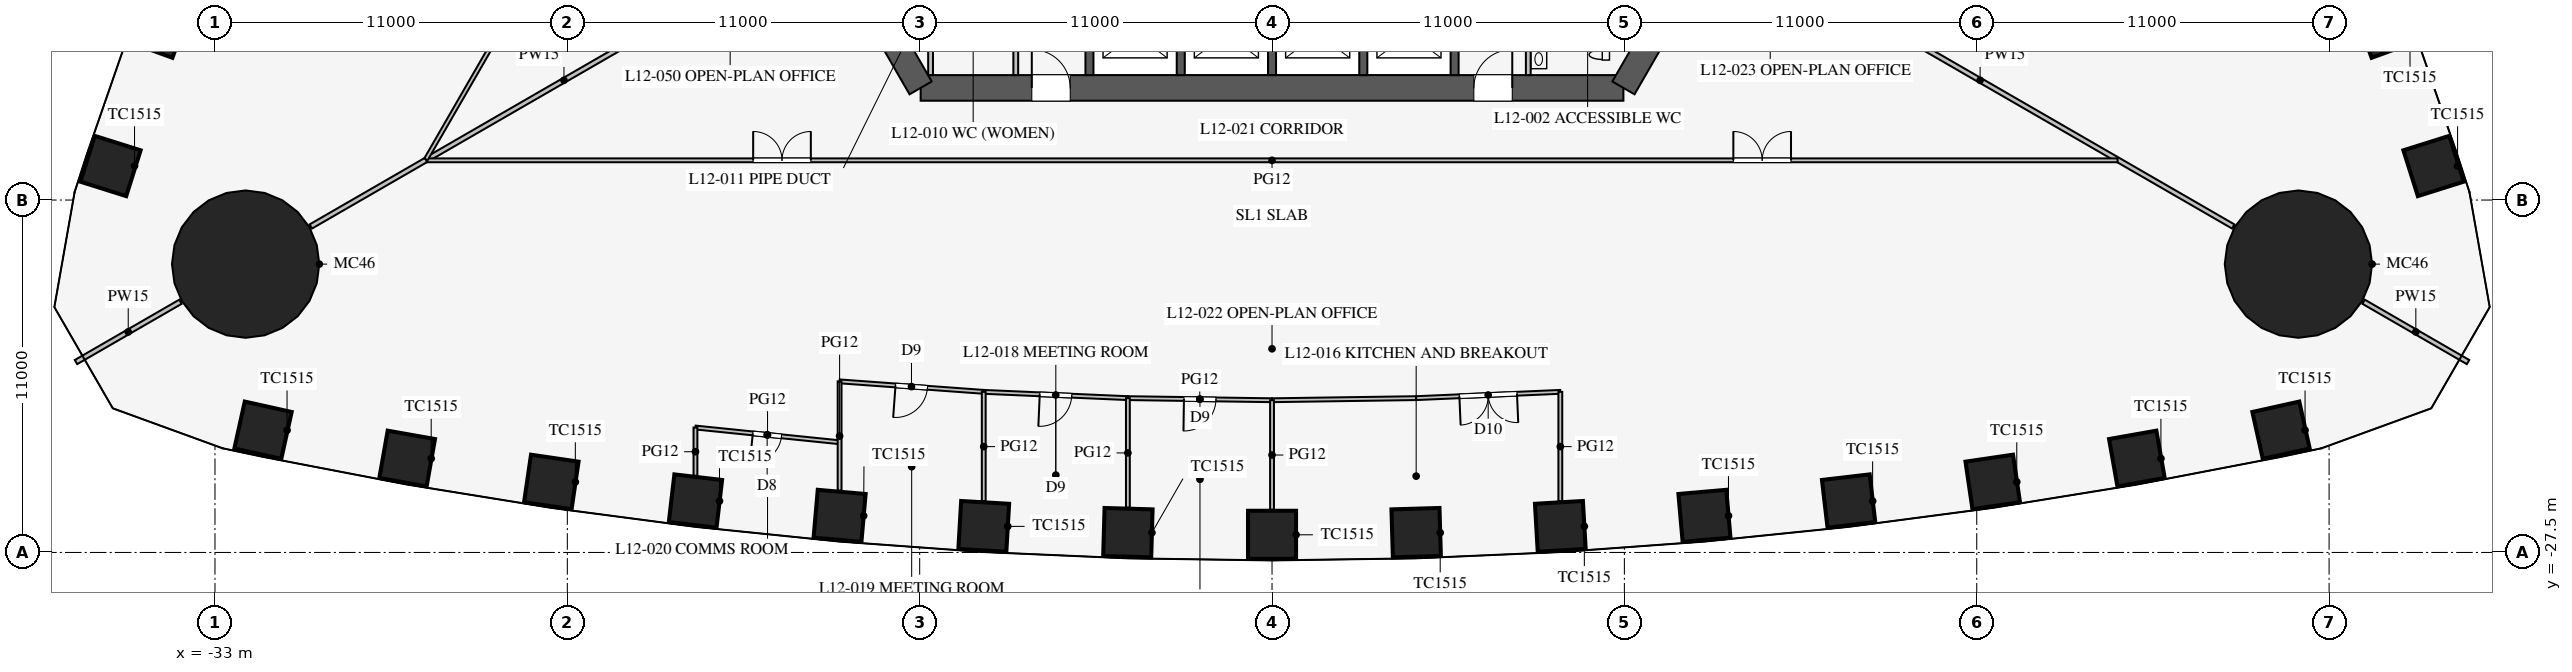
"""IFC4 building model, lengths in metres.
Left out: names, types, materials, properties, quantities, classifications, styles, units other than length and angle.
Written with IfcOpenShell. Run it as: python <this file> out.ifc"""

import sys

from ifc_helpers import new_model, si_unit, direction, frame, frame_2d, origin, origin_2d, place, context, subcontext, project, spatial, rectangle, circle, extrude, element, fill, save


model = new_model("IFC4")
c1 = context("Model", 3, precision=1e-05, world=origin(), true_north=direction((0.0, 1.0)))
c2 = subcontext(c1, "Body", "Model", "MODEL_VIEW")
j1 = project(units=[si_unit("LENGTHUNIT", "METRE"), si_unit("PLANEANGLEUNIT", "RADIAN")], contexts=[c1])
p1 = place(None, origin())
s1 = spatial("IfcSite", under=j1, at=p1, CompositionType="ELEMENT")
p2 = place(p1, origin())
s2 = spatial("IfcBuilding", under=s1, at=p2, CompositionType="ELEMENT")
p3 = place(p2, frame((0.0, 0.0, 54.3)))
s3 = spatial("IfcBuildingStorey", under=s2, at=p3, CompositionType="ELEMENT", Elevation=54.3)
for number, where, z_axis, x_axis in (
    (1, (-31.5, -23.685, 0.0), (0.0, 0.0, 1.0), (0.976, -0.217, 0.0)),
    (2, (-27.0, -24.568, 0.0), (0.0, 0.0, 1.0), (0.985, -0.174, 0.0)),
    (3, (-22.5, -25.299, 0.0), (0.0, 0.0, 1.0), (0.989, -0.145, 0.0)),
    (4, (-18.0, -25.895, 0.0), (0.0, 0.0, 1.0), (0.993, -0.116, 0.0)),
    (5, (-13.5, -26.357, 0.0), (0.0, 0.0, 1.0), (0.996, -0.087, 0.0)),
    (6, (-9.0, -26.686, 0.0), (0.0, 0.0, 1.0), (0.998, -0.058, 0.0)),
    (7, (-4.5, -26.883, 0.0), (0.0, 0.0, 1.0), (1.0, -0.029, 0.0)),
    (8, (0.0, -26.949, 0.0), (0.0, 0.0, 1.0), (1.0, 0.0, 0.0)),
    (9, (4.5, -26.883, 0.0), (0.0, 0.0, 1.0), (1.0, 0.029, 0.0)),
    (10, (9.0, -26.686, 0.0), (0.0, 0.0, 1.0), (0.998, 0.058, 0.0)),
    (11, (13.5, -26.357, 0.0), (0.0, 0.0, 1.0), (0.996, 0.087, 0.0)),
    (12, (18.0, -25.895, 0.0), (0.0, 0.0, 1.0), (0.993, 0.116, 0.0)),
    (13, (22.5, -25.299, 0.0), (0.0, 0.0, 1.0), (0.989, 0.145, 0.0)),
    (14, (27.0, -24.568, 0.0), (0.0, 0.0, 1.0), (0.985, 0.174, 0.0)),
    (15, (31.5, -23.685, 0.0), (0.0, 0.0, 1.0), (0.976, 0.217, 0.0)),
    (16, (36.262, -15.438, 0.0), (0.0, 0.0, 1.0), (-0.3, 0.954, 0.0)),
    (17, (34.776, -11.099, 0.0), (0.0, 0.0, 1.0), (-0.342, 0.94, 0.0)),
    (18, (-34.776, -11.099, 0.0), (0.0, 0.0, 1.0), (-0.342, -0.94, 0.0)),
    (19, (-36.262, -15.438, 0.0), (0.0, 0.0, 1.0), (-0.3, -0.954, 0.0)),
):
    element("IfcColumn", number, at=place(p3, frame(where, z_axis=z_axis, x_axis=x_axis)), inside=s3, PredefinedType="COLUMN", context=c2, shape_type="SweptSolid", body=[
        extrude(rectangle(XDim=1.5, YDim=1.5, at=origin_2d()), origin(), (0.0, 0.0, 1.0), 4.2),
    ])
for number, where, z_axis, x_axis in (
    (20, (32.043, -18.5, 0.0), (0.0, 0.0, 1.0), (1.0, 0.0, 0.0)),
    (21, (-32.043, -18.5, 0.0), (0.0, 0.0, 1.0), (1.0, 0.0, 0.0)),
):
    element("IfcColumn", number, at=place(p3, frame(where, z_axis=z_axis, x_axis=x_axis)), inside=s3, PredefinedType="COLUMN", context=c2, shape_type="SweptSolid", body=[
        extrude(circle(Radius=2.3, at=origin_2d()), origin(), (0.0, 0.0, 1.0), 4.2),
    ])
p4 = place(p3, frame((-10.97, -13.0, 0.0), z_axis=(0.0, 0.0, 1.0), x_axis=(1.0, 0.0, 0.0)))
e22 = element("IfcWall", 22, at=p4, inside=s3, PredefinedType="SHEAR", context=c2, shape_type="SweptSolid", body=[
    extrude(rectangle(XDim=21.939, YDim=0.8, at=frame_2d((10.97, 0.0))), origin(), (0.0, 0.0, 1.0), 4.2),
])
p5 = place(p4, frame((17.27, 0.0, 0.0)))
e23 = element("IfcOpeningElement", 23, at=p5, cuts=e22, PredefinedType="OPENING", context=c2, shape_type="SweptSolid", body=[
    extrude(rectangle(XDim=1.2, YDim=2.1, at=frame_2d((0.6, 1.05))), frame((0.0, 0.41, 0.0), z_axis=(0.0, -1.0, 0.0), x_axis=(1.0, 0.0, 0.0)), (0.0, 0.0, 1.0), 0.82),
])
p6 = place(p4, frame((3.47, 0.0, 0.0)))
e24 = element("IfcOpeningElement", 24, at=p6, cuts=e22, PredefinedType="OPENING", context=c2, shape_type="SweptSolid", body=[
    extrude(rectangle(XDim=1.2, YDim=2.1, at=frame_2d((0.6, 1.05))), frame((0.0, 0.41, 0.0), z_axis=(0.0, -1.0, 0.0), x_axis=(1.0, 0.0, 0.0)), (0.0, 0.0, 1.0), 0.82),
])
for number, where, z_axis, x_axis in (
    (25, (10.97, -13.0, 0.0), (0.0, 0.0, 1.0), (0.5, 0.866, 0.0)),
    (26, (-16.743, -3.0, 0.0), (0.0, 0.0, 1.0), (0.5, -0.866, 0.0)),
):
    element("IfcWall", number, at=place(p3, frame(where, z_axis=z_axis, x_axis=x_axis)), inside=s3, PredefinedType="SHEAR", context=c2, shape_type="SweptSolid", body=[
        extrude(rectangle(XDim=11.547, YDim=0.8, at=frame_2d((5.773, 0.0))), origin(), (0.0, 0.0, 1.0), 4.2),
    ])
for number, where, z_axis, x_axis in (
    (27, (-5.7, -10.025, 0.0), (0.0, 0.0, 1.0), (0.0, -1.0, 0.0)),
    (28, (-2.85, -10.025, 0.0), (0.0, 0.0, 1.0), (0.0, -1.0, 0.0)),
    (29, (0.0, -10.025, 0.0), (0.0, 0.0, 1.0), (0.0, -1.0, 0.0)),
    (30, (2.85, -10.025, 0.0), (0.0, 0.0, 1.0), (0.0, -1.0, 0.0)),
    (31, (5.7, -10.025, 0.0), (0.0, 0.0, 1.0), (0.0, -1.0, 0.0)),
):
    element("IfcWall", number, at=place(p3, frame(where, z_axis=z_axis, x_axis=x_axis)), inside=s3, PredefinedType="SHEAR", context=c2, shape_type="SweptSolid", body=[
        extrude(rectangle(XDim=2.575, YDim=0.25, at=frame_2d((1.288, 0.0))), origin(), (0.0, 0.0, 1.0), 4.2),
    ])
p7 = place(p3, frame((8.0, -7.5, 0.0), z_axis=(0.0, 0.0, 1.0), x_axis=(0.0, -1.0, 0.0)))
e32 = element("IfcWall", 32, at=p7, inside=s3, PredefinedType="PARTITIONING", context=c2, shape_type="SweptSolid", body=[
    extrude(rectangle(XDim=5.1, YDim=0.15, at=frame_2d((2.55, 0.0))), origin(), (0.0, 0.0, 1.0), 4.0),
])
p8 = place(p7, frame((2.6, 0.0, 0.0)))
e33 = element("IfcOpeningElement", 33, at=p8, cuts=e32, PredefinedType="OPENING", context=c2, shape_type="SweptSolid", body=[
    extrude(rectangle(XDim=0.9, YDim=2.1, at=frame_2d((0.45, 1.05))), frame((0.0, 0.085, 0.0), z_axis=(0.0, -1.0, 0.0), x_axis=(1.0, 0.0, 0.0)), (0.0, 0.0, 1.0), 0.17),
])
p9 = place(p3, frame((-8.0, -7.5, 0.0), z_axis=(0.0, 0.0, 1.0), x_axis=(0.0, -1.0, 0.0)))
e34 = element("IfcWall", 34, at=p9, inside=s3, PredefinedType="PARTITIONING", context=c2, shape_type="SweptSolid", body=[
    extrude(rectangle(XDim=5.1, YDim=0.15, at=frame_2d((2.55, 0.0))), origin(), (0.0, 0.0, 1.0), 4.0),
])
p10 = place(p9, frame((2.6, 0.0, 0.0)))
e35 = element("IfcOpeningElement", 35, at=p10, cuts=e34, PredefinedType="OPENING", context=c2, shape_type="SweptSolid", body=[
    extrude(rectangle(XDim=0.9, YDim=2.1, at=frame_2d((0.45, 1.05))), frame((0.0, 0.085, 0.0), z_axis=(0.0, -1.0, 0.0), x_axis=(1.0, 0.0, 0.0)), (0.0, 0.0, 1.0), 0.17),
])
p11 = place(p3, frame((-10.66, -8.5, 0.0), z_axis=(0.0, 0.0, 1.0), x_axis=(0.0, -1.0, 0.0)))
e36 = element("IfcWall", 36, at=p11, inside=s3, PredefinedType="PARTITIONING", context=c2, shape_type="SweptSolid", body=[
    extrude(rectangle(XDim=4.1, YDim=0.15, at=frame_2d((2.05, 0.0))), origin(), (0.0, 0.0, 1.0), 4.0),
])
p12 = place(p3, frame((14.203, -8.2, 0.0), z_axis=(0.0, 0.0, 1.0), x_axis=(0.866024965723, -0.500000758745, 0.0)))
e37 = element("IfcWall", 37, at=p12, inside=s3, PredefinedType="PARTITIONING", context=c2, shape_type="SweptSolid", body=[
    extrude(rectangle(XDim=18.25, YDim=0.15, at=frame_2d((9.125, 0.0))), origin(), (0.0, 0.0, 1.0), 2.3),
])
p13 = place(p3, frame((34.078, -19.675, 0.0), z_axis=(0.0, 0.0, 1.0), x_axis=(0.866019247219, -0.500010663332, 0.0)))
e38 = element("IfcWall", 38, at=p13, inside=s3, PredefinedType="PARTITIONING", context=c2, shape_type="SweptSolid", body=[
    extrude(rectangle(XDim=3.764, YDim=0.15, at=frame_2d((1.882, 0.0))), origin(), (0.0, 0.0, 1.0), 2.3),
])
p14 = place(p3, frame((-14.203, -8.2, 0.0), z_axis=(0.0, 0.0, 1.0), x_axis=(-0.866024965723, -0.500000758745, 0.0)))
e39 = element("IfcWall", 39, at=p14, inside=s3, PredefinedType="PARTITIONING", context=c2, shape_type="SweptSolid", body=[
    extrude(rectangle(XDim=18.25, YDim=0.15, at=frame_2d((9.125, 0.0))), origin(), (0.0, 0.0, 1.0), 2.3),
])
p15 = place(p3, frame((-34.078, -19.675, 0.0), z_axis=(0.0, 0.0, 1.0), x_axis=(-0.866019247219, -0.500010663332, 0.0)))
e40 = element("IfcWall", 40, at=p15, inside=s3, PredefinedType="PARTITIONING", context=c2, shape_type="SweptSolid", body=[
    extrude(rectangle(XDim=3.764, YDim=0.15, at=frame_2d((1.882, 0.0))), origin(), (0.0, 0.0, 1.0), 2.3),
])
p16 = place(p3, frame((-26.398, -15.26, 0.0), z_axis=(0.0, 0.0, 1.0), x_axis=(1.0, 0.0, 0.0)))
e41 = element("IfcWall", 41, at=p16, inside=s3, PredefinedType="PARTITIONING", context=c2, shape_type="SweptSolid", body=[
    extrude(rectangle(XDim=52.796, YDim=0.12, at=frame_2d((26.398, 0.0))), origin(), (0.0, 0.0, 1.0), 2.9),
])
p17 = place(p16, frame((10.2, 0.0, 0.15)))
e42 = element("IfcOpeningElement", 42, at=p17, cuts=e41, PredefinedType="OPENING", context=c2, shape_type="SweptSolid", body=[
    extrude(rectangle(XDim=1.8, YDim=2.1, at=frame_2d((0.9, 1.05))), frame((0.0, 0.07, 0.0), z_axis=(0.0, -1.0, 0.0), x_axis=(1.0, 0.0, 0.0)), (0.0, 0.0, 1.0), 0.14),
])
p18 = place(p16, frame((40.8, 0.0, 0.15)))
e43 = element("IfcOpeningElement", 43, at=p18, cuts=e41, PredefinedType="OPENING", context=c2, shape_type="SweptSolid", body=[
    extrude(rectangle(XDim=1.8, YDim=2.1, at=frame_2d((0.9, 1.05))), frame((0.0, 0.07, 0.0), z_axis=(0.0, -1.0, 0.0), x_axis=(1.0, 0.0, 0.0)), (0.0, 0.0, 1.0), 0.14),
])
p19 = place(p3, frame((0.0, -22.749, 0.0), z_axis=(0.0, 0.0, 1.0), x_axis=(0.999894311967, 0.014538393859, 0.0)))
e44 = element("IfcWall", 44, at=p19, inside=s3, PredefinedType="PARTITIONING", context=c2, shape_type="SweptSolid", body=[
    extrude(rectangle(XDim=4.5, YDim=0.12, at=frame_2d((2.25, 0.0))), origin(), (0.0, 0.0, 1.0), 2.9),
])
p20 = place(p3, frame((4.5, -22.683, 0.0), z_axis=(0.0, 0.0, 1.0), x_axis=(0.999052370647, 0.043524254212, 0.0)))
e45 = element("IfcWall", 45, at=p20, inside=s3, PredefinedType="PARTITIONING", context=c2, shape_type="SweptSolid", body=[
    extrude(rectangle(XDim=4.504, YDim=0.12, at=frame_2d((2.252, 0.0))), origin(), (0.0, 0.0, 1.0), 2.9),
])
p21 = place(p20, frame((1.35, 0.0, 0.15)))
e46 = element("IfcOpeningElement", 46, at=p21, cuts=e45, PredefinedType="OPENING", context=c2, shape_type="SweptSolid", body=[
    extrude(rectangle(XDim=1.8, YDim=2.1, at=frame_2d((0.9, 1.05))), frame((0.0, 0.07, 0.0), z_axis=(0.0, -1.0, 0.0), x_axis=(1.0, 0.0, 0.0)), (0.0, 0.0, 1.0), 0.14),
])
p22 = place(p3, frame((-13.5, -22.16, 0.0), z_axis=(0.0, 0.0, 1.0), x_axis=(0.997363894896, -0.072562119306, 0.0)))
e47 = element("IfcWall", 47, at=p22, inside=s3, PredefinedType="PARTITIONING", context=c2, shape_type="SweptSolid", body=[
    extrude(rectangle(XDim=4.512, YDim=0.12, at=frame_2d((2.256, 0.0))), origin(), (0.0, 0.0, 1.0), 2.9),
])
p23 = place(p22, frame((1.75, 0.0, 0.15)))
e48 = element("IfcOpeningElement", 48, at=p23, cuts=e47, PredefinedType="OPENING", context=c2, shape_type="SweptSolid", body=[
    extrude(rectangle(XDim=1.0, YDim=2.1, at=frame_2d((0.5, 1.05))), frame((0.0, 0.07, 0.0), z_axis=(0.0, -1.0, 0.0), x_axis=(1.0, 0.0, 0.0)), (0.0, 0.0, 1.0), 0.14),
])
p24 = place(p3, frame((-18.0, -23.601, 0.0), z_axis=(0.0, 0.0, 1.0), x_axis=(0.994827688697, -0.101576915697, 0.0)))
e49 = element("IfcWall", 49, at=p24, inside=s3, PredefinedType="PARTITIONING", context=c2, shape_type="SweptSolid", body=[
    extrude(rectangle(XDim=4.523, YDim=0.12, at=frame_2d((2.262, 0.0))), origin(), (0.0, 0.0, 1.0), 2.9),
])
p25 = place(p24, frame((1.8, 0.0, 0.15)))
e50 = element("IfcOpeningElement", 50, at=p25, cuts=e49, PredefinedType="OPENING", context=c2, shape_type="SweptSolid", body=[
    extrude(rectangle(XDim=0.9, YDim=2.1, at=frame_2d((0.45, 1.05))), frame((0.0, 0.07, 0.0), z_axis=(0.0, -1.0, 0.0), x_axis=(1.0, 0.0, 0.0)), (0.0, 0.0, 1.0), 0.14),
])
p26 = place(p3, frame((-4.5, -22.683, 0.0), z_axis=(0.0, 0.0, 1.0), x_axis=(0.999894311967, -0.014538393859, 0.0)))
e51 = element("IfcWall", 51, at=p26, inside=s3, PredefinedType="PARTITIONING", context=c2, shape_type="SweptSolid", body=[
    extrude(rectangle(XDim=4.5, YDim=0.12, at=frame_2d((2.25, 0.0))), origin(), (0.0, 0.0, 1.0), 2.9),
])
p27 = place(p26, frame((1.75, 0.0, 0.15)))
e52 = element("IfcOpeningElement", 52, at=p27, cuts=e51, PredefinedType="OPENING", context=c2, shape_type="SweptSolid", body=[
    extrude(rectangle(XDim=1.0, YDim=2.1, at=frame_2d((0.5, 1.05))), frame((0.0, 0.07, 0.0), z_axis=(0.0, -1.0, 0.0), x_axis=(1.0, 0.0, 0.0)), (0.0, 0.0, 1.0), 0.14),
])
p28 = place(p3, frame((-9.0, -22.487, 0.0), z_axis=(0.0, 0.0, 1.0), x_axis=(0.999052370647, -0.043524254212, 0.0)))
e53 = element("IfcWall", 53, at=p28, inside=s3, PredefinedType="PARTITIONING", context=c2, shape_type="SweptSolid", body=[
    extrude(rectangle(XDim=4.504, YDim=0.12, at=frame_2d((2.252, 0.0))), origin(), (0.0, 0.0, 1.0), 2.9),
])
p29 = place(p28, frame((1.75, 0.0, 0.15)))
e54 = element("IfcOpeningElement", 54, at=p29, cuts=e53, PredefinedType="OPENING", context=c2, shape_type="SweptSolid", body=[
    extrude(rectangle(XDim=1.0, YDim=2.1, at=frame_2d((0.5, 1.05))), frame((0.0, 0.07, 0.0), z_axis=(0.0, -1.0, 0.0), x_axis=(1.0, 0.0, 0.0)), (0.0, 0.0, 1.0), 0.14),
])
p30 = place(p3, frame((0.0, -22.749, 0.0), z_axis=(0.0, 0.0, 1.0), x_axis=(0.0, -1.0, 0.0)))
e55 = element("IfcWall", 55, at=p30, inside=s3, PredefinedType="PARTITIONING", context=c2, shape_type="SweptSolid", body=[
    extrude(rectangle(XDim=3.42, YDim=0.12, at=frame_2d((1.71, 0.0))), origin(), (0.0, 0.0, 1.0), 2.9),
])
p31 = place(p3, frame((9.0, -22.487, 0.0), z_axis=(0.0, 0.0, 1.0), x_axis=(0.0, -1.0, 0.0)))
e56 = element("IfcWall", 56, at=p31, inside=s3, PredefinedType="PARTITIONING", context=c2, shape_type="SweptSolid", body=[
    extrude(rectangle(XDim=3.417, YDim=0.12, at=frame_2d((1.709, 0.0))), origin(), (0.0, 0.0, 1.0), 2.9),
])
p32 = place(p3, frame((-13.5, -22.16, 0.0), z_axis=(0.0, 0.0, 1.0), x_axis=(0.0, -1.0, 0.0)))
e57 = element("IfcWall", 57, at=p32, inside=s3, PredefinedType="PARTITIONING", context=c2, shape_type="SweptSolid", body=[
    extrude(rectangle(XDim=3.414, YDim=0.12, at=frame_2d((1.707, 0.0))), origin(), (0.0, 0.0, 1.0), 2.9),
])
p33 = place(p3, frame((-18.0, -23.601, 0.0), z_axis=(0.0, 0.0, 1.0), x_axis=(0.0, -1.0, 0.0)))
e58 = element("IfcWall", 58, at=p33, inside=s3, PredefinedType="PARTITIONING", context=c2, shape_type="SweptSolid", body=[
    extrude(rectangle(XDim=1.509, YDim=0.12, at=frame_2d((0.755, 0.0))), origin(), (0.0, 0.0, 1.0), 2.9),
])
p34 = place(p3, frame((-4.5, -22.683, 0.0), z_axis=(0.0, 0.0, 1.0), x_axis=(0.0, -1.0, 0.0)))
e59 = element("IfcWall", 59, at=p34, inside=s3, PredefinedType="PARTITIONING", context=c2, shape_type="SweptSolid", body=[
    extrude(rectangle(XDim=3.419, YDim=0.12, at=frame_2d((1.71, 0.0))), origin(), (0.0, 0.0, 1.0), 2.9),
])
p35 = place(p3, frame((-9.0, -22.487, 0.0), z_axis=(0.0, 0.0, 1.0), x_axis=(0.0, -1.0, 0.0)))
e60 = element("IfcWall", 60, at=p35, inside=s3, PredefinedType="PARTITIONING", context=c2, shape_type="SweptSolid", body=[
    extrude(rectangle(XDim=3.417, YDim=0.12, at=frame_2d((1.709, 0.0))), origin(), (0.0, 0.0, 1.0), 2.9),
])
p36 = place(p3, frame((-0.016, 30.491, 0.0), z_axis=(0.0, 0.0, 1.0), x_axis=(-0.50000091641, -0.866024874695, 0.0)))
e61 = element("IfcWall", 61, at=p36, inside=s3, PredefinedType="PARTITIONING", context=c2, shape_type="SweptSolid", body=[
    extrude(rectangle(XDim=52.796, YDim=0.12, at=frame_2d((26.398, 0.0))), origin(), (0.0, 0.0, 1.0), 2.9),
])
p37 = place(p36, frame((10.2, 0.0, 0.15)))
e62 = element("IfcOpeningElement", 62, at=p37, cuts=e61, PredefinedType="OPENING", context=c2, shape_type="SweptSolid", body=[
    extrude(rectangle(XDim=1.8, YDim=2.1, at=frame_2d((0.9, 1.05))), frame((0.0, 0.07, 0.0), z_axis=(0.0, -1.0, 0.0), x_axis=(1.0, 0.0, 0.0)), (0.0, 0.0, 1.0), 0.14),
])
p38 = place(p36, frame((40.8, 0.0, 0.15)))
e63 = element("IfcOpeningElement", 63, at=p38, cuts=e61, PredefinedType="OPENING", context=c2, shape_type="SweptSolid", body=[
    extrude(rectangle(XDim=1.8, YDim=2.1, at=frame_2d((0.9, 1.05))), frame((0.0, 0.07, 0.0), z_axis=(0.0, -1.0, 0.0), x_axis=(1.0, 0.0, 0.0)), (0.0, 0.0, 1.0), 0.14),
])
p39 = place(p5, origin())
e64 = element("IfcDoor", 64, at=p39, inside=s3, OperationType="SINGLE_SWING_RIGHT", PredefinedType="DOOR", context=c2, shape_type="SweptSolid", body=[
    extrude(rectangle(XDim=1.2, YDim=2.1, at=frame_2d((0.6, 1.05))), frame((0.0, 0.025, 0.0), z_axis=(0.0, -1.0, 0.0), x_axis=(1.0, 0.0, 0.0)), (0.0, 0.0, 1.0), 0.05),
])
fill(e23, e64)
p40 = place(p6, origin())
e65 = element("IfcDoor", 65, at=p40, inside=s3, OperationType="SINGLE_SWING_LEFT", PredefinedType="DOOR", context=c2, shape_type="SweptSolid", body=[
    extrude(rectangle(XDim=1.2, YDim=2.1, at=frame_2d((0.6, 1.05))), frame((0.0, 0.025, 0.0), z_axis=(0.0, -1.0, 0.0), x_axis=(1.0, 0.0, 0.0)), (0.0, 0.0, 1.0), 0.05),
])
fill(e24, e65)
p41 = place(p21, frame((1.8, 0.0, 0.0), z_axis=(0.0, 0.0, 1.0), x_axis=(-1.0, 0.0, 0.0)))
e66 = element("IfcDoor", 66, at=p41, inside=s3, OperationType="DOUBLE_DOOR_SINGLE_SWING", PredefinedType="DOOR", context=c2, shape_type="SweptSolid", body=[
    extrude(rectangle(XDim=1.8, YDim=2.1, at=frame_2d((0.9, 1.05))), frame((0.0, 0.025, 0.0), z_axis=(0.0, -1.0, 0.0), x_axis=(1.0, 0.0, 0.0)), (0.0, 0.0, 1.0), 0.05),
])
fill(e46, e66)
p42 = place(p27, frame((1.0, 0.0, 0.0), z_axis=(0.0, 0.0, 1.0), x_axis=(-1.0, 0.0, 0.0)))
e67 = element("IfcDoor", 67, at=p42, inside=s3, OperationType="SINGLE_SWING_RIGHT", PredefinedType="DOOR", context=c2, shape_type="SweptSolid", body=[
    extrude(rectangle(XDim=1.0, YDim=2.1, at=frame_2d((0.5, 1.05))), frame((0.0, 0.025, 0.0), z_axis=(0.0, -1.0, 0.0), x_axis=(1.0, 0.0, 0.0)), (0.0, 0.0, 1.0), 0.05),
])
fill(e52, e67)
p43 = place(p29, frame((1.0, 0.0, 0.0), z_axis=(0.0, 0.0, 1.0), x_axis=(-1.0, 0.0, 0.0)))
e68 = element("IfcDoor", 68, at=p43, inside=s3, OperationType="SINGLE_SWING_RIGHT", PredefinedType="DOOR", context=c2, shape_type="SweptSolid", body=[
    extrude(rectangle(XDim=1.0, YDim=2.1, at=frame_2d((0.5, 1.05))), frame((0.0, 0.025, 0.0), z_axis=(0.0, -1.0, 0.0), x_axis=(1.0, 0.0, 0.0)), (0.0, 0.0, 1.0), 0.05),
])
fill(e54, e68)
p44 = place(p23, frame((1.0, 0.0, 0.0), z_axis=(0.0, 0.0, 1.0), x_axis=(-1.0, 0.0, 0.0)))
e69 = element("IfcDoor", 69, at=p44, inside=s3, OperationType="SINGLE_SWING_RIGHT", PredefinedType="DOOR", context=c2, shape_type="SweptSolid", body=[
    extrude(rectangle(XDim=1.0, YDim=2.1, at=frame_2d((0.5, 1.05))), frame((0.0, 0.025, 0.0), z_axis=(0.0, -1.0, 0.0), x_axis=(1.0, 0.0, 0.0)), (0.0, 0.0, 1.0), 0.05),
])
fill(e48, e69)
p45 = place(p25, frame((0.9, 0.0, 0.0), z_axis=(0.0, 0.0, 1.0), x_axis=(-1.0, 0.0, 0.0)))
e70 = element("IfcDoor", 70, at=p45, inside=s3, OperationType="SINGLE_SWING_RIGHT", PredefinedType="DOOR", context=c2, shape_type="SweptSolid", body=[
    extrude(rectangle(XDim=0.9, YDim=2.1, at=frame_2d((0.45, 1.05))), frame((0.0, 0.025, 0.0), z_axis=(0.0, -1.0, 0.0), x_axis=(1.0, 0.0, 0.0)), (0.0, 0.0, 1.0), 0.05),
])
fill(e50, e70)
p46 = place(p17, origin())
e71 = element("IfcDoor", 71, at=p46, inside=s3, OperationType="DOUBLE_DOOR_SINGLE_SWING", PredefinedType="DOOR", context=c2, shape_type="SweptSolid", body=[
    extrude(rectangle(XDim=1.8, YDim=2.1, at=frame_2d((0.9, 1.05))), frame((0.0, 0.025, 0.0), z_axis=(0.0, -1.0, 0.0), x_axis=(1.0, 0.0, 0.0)), (0.0, 0.0, 1.0), 0.05),
])
fill(e42, e71)
p47 = place(p18, origin())
e72 = element("IfcDoor", 72, at=p47, inside=s3, OperationType="DOUBLE_DOOR_SINGLE_SWING", PredefinedType="DOOR", context=c2, shape_type="SweptSolid", body=[
    extrude(rectangle(XDim=1.8, YDim=2.1, at=frame_2d((0.9, 1.05))), frame((0.0, 0.025, 0.0), z_axis=(0.0, -1.0, 0.0), x_axis=(1.0, 0.0, 0.0)), (0.0, 0.0, 1.0), 0.05),
])
fill(e43, e72)
save(model, sys.argv[1])
